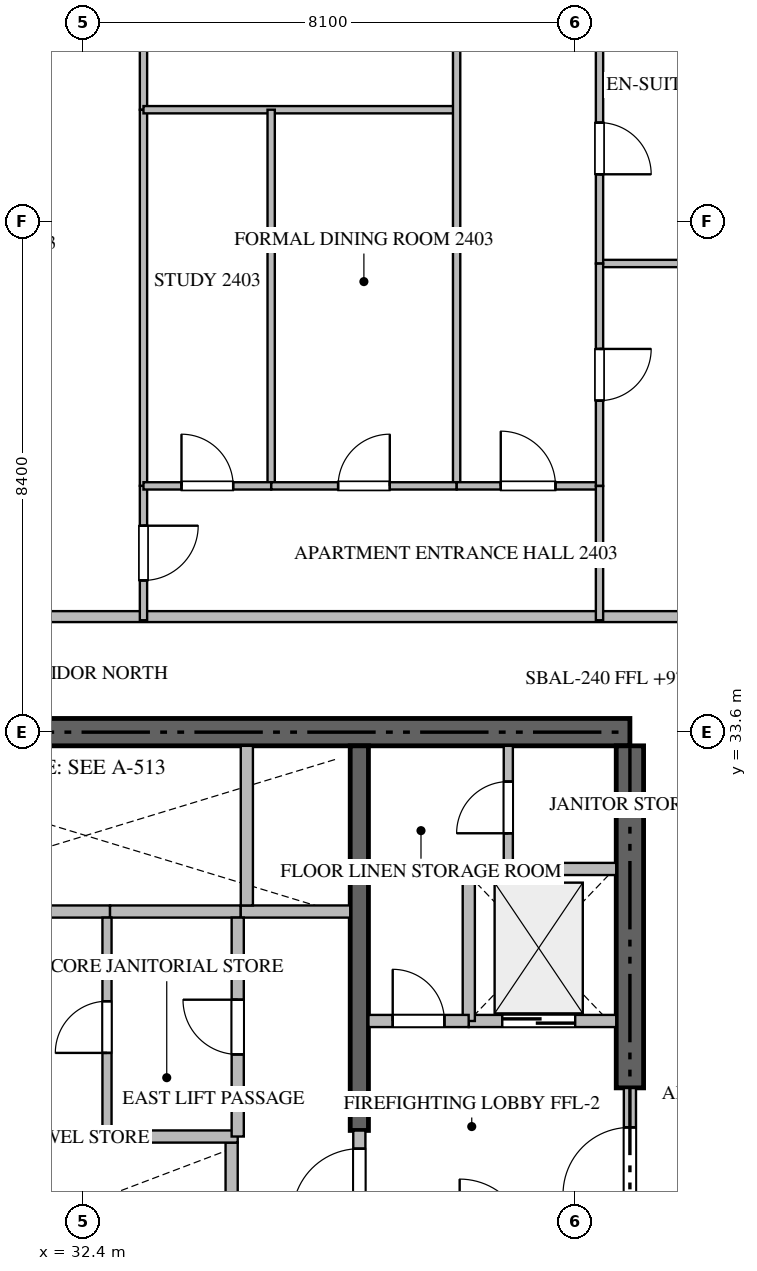
"""IFC4 building model, lengths in metres.
Left out: names, types, materials, properties, quantities, classifications, styles, units other than length and angle.
Written with IfcOpenShell. Run it as: python <this file> out.ifc"""

import sys

from ifc_helpers import new_model, si_unit, direction, frame, frame_2d, origin, place, context, subcontext, project, spatial, rectangle, extrude, source, transform, mapped, element, fill, save


model = new_model("IFC4")
c1 = context("Model", 3, precision=1e-05, world=origin(), true_north=direction((0.0, 1.0)))
c2 = subcontext(c1, "Body", "Model", "MODEL_VIEW")
j1 = project(units=[si_unit("LENGTHUNIT", "METRE"), si_unit("PLANEANGLEUNIT", "RADIAN")], contexts=[c1])
p1 = place(None, origin())
s1 = spatial("IfcSite", under=j1, at=p1, CompositionType="ELEMENT")
p2 = place(p1, origin())
s2 = spatial("IfcBuilding", under=s1, at=p2, CompositionType="ELEMENT")
p3 = place(p2, frame((0.0, 0.0, 97.95)))
s3 = spatial("IfcBuildingStorey", under=s2, at=p3, CompositionType="ELEMENT", Elevation=97.95)
p4 = place(p3, frame((41.4, 33.6, -0.26), z_axis=(0.0, 0.0, 1.0), x_axis=(-1.0, 0.0, 0.0)))
e1 = element("IfcWall", 1, at=p4, inside=s3, PredefinedType="SHEAR", context=c2, shape_type="SweptSolid", body=[
    extrude(rectangle(XDim=18.0, YDim=0.45, at=frame_2d((9.0, 0.0))), origin(), (0.0, 0.0, 1.0), 3.748),
])
p5 = place(p3, frame((41.4, 27.75, -0.26), z_axis=(0.0, 0.0, 1.0), x_axis=(0.0, 1.0, 0.0)))
e2 = element("IfcWall", 2, at=p5, inside=s3, PredefinedType="SHEAR", context=c2, shape_type="SweptSolid", body=[
    extrude(rectangle(XDim=5.625, YDim=0.45, at=frame_2d((2.812, 0.0))), origin(), (0.0, 0.0, 1.0), 3.748),
])
p6 = place(p3, frame((36.95, 27.05, -0.26), z_axis=(0.0, 0.0, 1.0), x_axis=(0.0, 1.0, 0.0)))
e3 = element("IfcWall", 3, at=p6, inside=s3, PredefinedType="SHEAR", context=c2, shape_type="SweptSolid", body=[
    extrude(rectangle(XDim=6.325, YDim=0.3, at=frame_2d((3.163, 0.0))), origin(), (0.0, 0.0, 1.0), 3.748),
])
p7 = place(p3, frame((38.75, 28.85, 0.0), z_axis=(0.0, 0.0, 1.0), x_axis=(1.0, 0.0, 0.0)))
e4 = element("IfcWall", 4, at=p7, inside=s3, PredefinedType="STANDARD", context=c2, shape_type="SweptSolid", body=[
    extrude(rectangle(XDim=2.425, YDim=0.2, at=frame_2d((1.212, 0.0))), origin(), (0.0, 0.0, 1.0), 3.49),
])
p8 = place(p7, frame((0.55, 0.0, 0.0)))
e5 = element("IfcOpeningElement", 5, at=p8, cuts=e4, PredefinedType="OPENING", context=c2, shape_type="SweptSolid", body=[
    extrude(rectangle(XDim=1.2, YDim=2.2, at=frame_2d((0.6, 1.1))), frame((0.0, 0.11, 0.0), z_axis=(0.0, -1.0, 0.0), x_axis=(1.0, 0.0, 0.0)), (0.0, 0.0, 1.0), 0.22),
])
p9 = place(p3, frame((34.85, 24.35, 0.0), z_axis=(0.0, 0.0, 1.0), x_axis=(0.0, 1.0, 0.0)))
e6 = element("IfcWall", 6, at=p9, inside=s3, PredefinedType="STANDARD", context=c2, shape_type="SweptSolid", body=[
    extrude(rectangle(XDim=2.5, YDim=0.2, at=frame_2d((1.25, 0.0))), origin(), (0.0, 0.0, 1.0), 3.49),
])
p10 = place(p3, frame((30.55, 30.65, 0.0), z_axis=(0.0, 0.0, 1.0), x_axis=(1.0, 0.0, 0.0)))
e7 = element("IfcWall", 7, at=p10, inside=s3, PredefinedType="STANDARD", context=c2, shape_type="SweptSolid", body=[
    extrude(rectangle(XDim=2.3, YDim=0.2, at=frame_2d((1.15, 0.0))), origin(), (0.0, 0.0, 1.0), 3.49),
])
p11 = place(p3, frame((32.85, 30.65, 0.0), z_axis=(0.0, 0.0, 1.0), x_axis=(1.0, 0.0, 0.0)))
e8 = element("IfcWall", 8, at=p11, inside=s3, PredefinedType="STANDARD", context=c2, shape_type="SweptSolid", body=[
    extrude(rectangle(XDim=2.15, YDim=0.2, at=frame_2d((1.075, 0.0))), origin(), (0.0, 0.0, 1.0), 3.49),
])
p12 = place(p3, frame((35.0, 30.65, 0.0), z_axis=(0.0, 0.0, 1.0), x_axis=(1.0, 0.0, 0.0)))
e9 = element("IfcWall", 9, at=p12, inside=s3, PredefinedType="STANDARD", context=c2, shape_type="SweptSolid", body=[
    extrude(rectangle(XDim=1.8, YDim=0.2, at=frame_2d((0.9, 0.0))), origin(), (0.0, 0.0, 1.0), 3.49),
])
p13 = place(p3, frame((35.1, 30.75, 0.0), z_axis=(0.0, 0.0, 1.0), x_axis=(0.0, 1.0, 0.0)))
e10 = element("IfcWall", 10, at=p13, inside=s3, PredefinedType="STANDARD", context=c2, shape_type="SweptSolid", body=[
    extrude(rectangle(XDim=2.625, YDim=0.2, at=frame_2d((1.312, 0.0))), origin(), (0.0, 0.0, 1.0), 3.49),
])
p14 = place(p3, frame((38.75, 28.85, 0.0), z_axis=(0.0, 0.0, 1.0), x_axis=(0.0, 1.0, 0.0)))
e11 = element("IfcWall", 11, at=p14, inside=s3, PredefinedType="STANDARD", context=c2, shape_type="SweptSolid", body=[
    extrude(rectangle(XDim=2.5, YDim=0.2, at=frame_2d((1.25, 0.0))), origin(), (0.0, 0.0, 1.0), 3.49),
])
p15 = place(p3, frame((38.75, 31.35, 0.0), z_axis=(0.0, 0.0, 1.0), x_axis=(1.0, 0.0, 0.0)))
e12 = element("IfcWall", 12, at=p15, inside=s3, PredefinedType="STANDARD", context=c2, shape_type="SweptSolid", body=[
    extrude(rectangle(XDim=2.425, YDim=0.2, at=frame_2d((1.212, 0.0))), origin(), (0.0, 0.0, 1.0), 3.49),
])
p16 = place(p3, frame((37.1, 28.85, 0.0), z_axis=(0.0, 0.0, 1.0), x_axis=(1.0, 0.0, 0.0)))
e13 = element("IfcWall", 13, at=p16, inside=s3, PredefinedType="STANDARD", context=c2, shape_type="SweptSolid", body=[
    extrude(rectangle(XDim=1.648, YDim=0.2, at=frame_2d((0.824, 0.0))), origin(), (0.0, 0.0, 1.0), 3.49),
])
p17 = place(p16, frame((0.399, 0.0, 0.0)))
e14 = element("IfcOpeningElement", 14, at=p17, cuts=e13, PredefinedType="OPENING", context=c2, shape_type="SweptSolid", body=[
    extrude(rectangle(XDim=0.85, YDim=2.1, at=frame_2d((0.425, 1.05))), frame((0.0, 0.11, 0.0), z_axis=(0.0, -1.0, 0.0), x_axis=(1.0, 0.0, 0.0)), (0.0, 0.0, 1.0), 0.22),
])
p18 = place(p3, frame((41.4, 25.352, 0.0), z_axis=(0.0, 0.0, 1.0), x_axis=(0.0, 1.0, 0.0)))
e15 = element("IfcWall", 15, at=p18, inside=s3, PredefinedType="STANDARD", context=c2, shape_type="SweptSolid", body=[
    extrude(rectangle(XDim=2.396, YDim=0.2, at=frame_2d((1.198, 0.0))), origin(), (0.0, 0.0, 1.0), 3.49),
])
p19 = place(p18, frame((0.648, 0.0, 0.0)))
e16 = element("IfcOpeningElement", 16, at=p19, cuts=e15, PredefinedType="OPENING", context=c2, shape_type="SweptSolid", body=[
    extrude(rectangle(XDim=1.1, YDim=2.15, at=frame_2d((0.55, 1.075))), frame((0.0, 0.11, 0.0), z_axis=(0.0, -1.0, 0.0), x_axis=(1.0, 0.0, 0.0)), (0.0, 0.0, 1.0), 0.22),
])
p20 = place(p3, frame((36.95, 25.352, 0.0), z_axis=(0.0, 0.0, 1.0), x_axis=(0.0, 1.0, 0.0)))
e17 = element("IfcWall", 17, at=p20, inside=s3, PredefinedType="STANDARD", context=c2, shape_type="SweptSolid", body=[
    extrude(rectangle(XDim=1.696, YDim=0.2, at=frame_2d((0.848, 0.0))), origin(), (0.0, 0.0, 1.0), 3.49),
])
p21 = place(p20, frame((0.298, 0.0, 0.0)))
e18 = element("IfcOpeningElement", 18, at=p21, cuts=e17, PredefinedType="OPENING", context=c2, shape_type="SweptSolid", body=[
    extrude(rectangle(XDim=1.1, YDim=2.15, at=frame_2d((0.55, 1.075))), frame((0.0, 0.11, 0.0), z_axis=(0.0, -1.0, 0.0), x_axis=(1.0, 0.0, 0.0)), (0.0, 0.0, 1.0), 0.22),
])
p22 = place(p3, frame((28.0, 26.95, 0.0), z_axis=(0.0, 0.0, 1.0), x_axis=(1.0, 0.0, 0.0)))
e19 = element("IfcWall", 19, at=p22, inside=s3, PredefinedType="STANDARD", context=c2, shape_type="SweptSolid", body=[
    extrude(rectangle(XDim=6.95, YDim=0.2, at=frame_2d((3.475, 0.0))), origin(), (0.0, 0.0, 1.0), 3.49),
])
p23 = place(p3, frame((39.4, 31.35, 0.0), z_axis=(0.0, 0.0, 1.0), x_axis=(0.0, 1.0, 0.0)))
e20 = element("IfcWall", 20, at=p23, inside=s3, PredefinedType="PARTITIONING", context=c2, shape_type="SweptSolid", body=[
    extrude(rectangle(XDim=2.025, YDim=0.15, at=frame_2d((1.012, 0.0))), origin(), (0.0, 0.0, 1.0), 3.49),
])
p24 = place(p23, frame((0.587, 0.0, 0.0)))
e21 = element("IfcOpeningElement", 21, at=p24, cuts=e20, PredefinedType="OPENING", context=c2, shape_type="SweptSolid", body=[
    extrude(rectangle(XDim=0.85, YDim=2.1, at=frame_2d((0.425, 1.05))), frame((0.0, 0.085, 0.0), z_axis=(0.0, -1.0, 0.0), x_axis=(1.0, 0.0, 0.0)), (0.0, 0.0, 1.0), 0.17),
])
p25 = place(p3, frame((34.95, 26.95, 0.0), z_axis=(0.0, 0.0, 1.0), x_axis=(0.0, 1.0, 0.0)))
e22 = element("IfcWall", 22, at=p25, inside=s3, PredefinedType="STANDARD", context=c2, shape_type="SweptSolid", body=[
    extrude(rectangle(XDim=3.6, YDim=0.2, at=frame_2d((1.8, 0.0))), origin(), (0.0, 0.0, 1.0), 3.49),
])
p26 = place(p25, frame((1.35, 0.0, 0.0)))
e23 = element("IfcOpeningElement", 23, at=p26, cuts=e22, PredefinedType="OPENING", context=c2, shape_type="SweptSolid", body=[
    extrude(rectangle(XDim=0.9, YDim=2.1, at=frame_2d((0.45, 1.05))), frame((0.0, 0.11, 0.0), z_axis=(0.0, -1.0, 0.0), x_axis=(1.0, 0.0, 0.0)), (0.0, 0.0, 1.0), 0.22),
])
p27 = place(p3, frame((32.8, 26.95, 0.0), z_axis=(0.0, 0.0, 1.0), x_axis=(0.0, 1.0, 0.0)))
e24 = element("IfcWall", 24, at=p27, inside=s3, PredefinedType="PARTITIONING", context=c2, shape_type="SweptSolid", body=[
    extrude(rectangle(XDim=3.6, YDim=0.15, at=frame_2d((1.8, 0.0))), origin(), (0.0, 0.0, 1.0), 3.49),
])
p28 = place(p27, frame((1.375, 0.0, 0.0)))
e25 = element("IfcOpeningElement", 25, at=p28, cuts=e24, PredefinedType="OPENING", context=c2, shape_type="SweptSolid", body=[
    extrude(rectangle(XDim=0.85, YDim=2.1, at=frame_2d((0.425, 1.05))), frame((0.0, 0.085, 0.0), z_axis=(0.0, -1.0, 0.0), x_axis=(1.0, 0.0, 0.0)), (0.0, 0.0, 1.0), 0.17),
])
p29 = place(p3, frame((21.402, 35.5, 0.0), z_axis=(0.0, 0.0, 1.0), x_axis=(1.0, 0.0, 0.0)))
e26 = element("IfcWall", 26, at=p29, inside=s3, PredefinedType="PARTITIONING", context=c2, shape_type="SweptSolid", body=[
    extrude(rectangle(XDim=21.996, YDim=0.18, at=frame_2d((10.998, 0.0))), origin(), (0.0, 0.0, 1.0), 3.49),
])
p30 = place(p29, frame((7.202, 0.0, 0.0)))
e27 = element("IfcOpeningElement", 27, at=p30, cuts=e26, PredefinedType="OPENING", context=c2, shape_type="SweptSolid", body=[
    extrude(rectangle(XDim=1.0, YDim=2.15, at=frame_2d((0.5, 1.075))), frame((0.0, 0.1, 0.0), z_axis=(0.0, -1.0, 0.0), x_axis=(1.0, 0.0, 0.0)), (0.0, 0.0, 1.0), 0.2),
])
p31 = place(p3, frame((33.4, 37.65, 0.0), z_axis=(0.0, 0.0, 1.0), x_axis=(0.0, -1.0, 0.0)))
e28 = element("IfcWall", 28, at=p31, inside=s3, PredefinedType="PARTITIONING", context=c2, shape_type="SweptSolid", body=[
    extrude(rectangle(XDim=2.21, YDim=0.12, at=frame_2d((1.105, 0.0))), origin(), (0.0, 0.0, 1.0), 3.49),
])
p32 = place(p31, frame((0.655, 0.0, 0.0)))
e29 = element("IfcOpeningElement", 29, at=p32, cuts=e28, PredefinedType="OPENING", context=c2, shape_type="SweptSolid", body=[
    extrude(rectangle(XDim=0.9, YDim=2.1, at=frame_2d((0.45, 1.05))), frame((0.0, 0.07, 0.0), z_axis=(0.0, -1.0, 0.0), x_axis=(1.0, 0.0, 0.0)), (0.0, 0.0, 1.0), 0.14),
])
p33 = place(p3, frame((33.4, 50.105, 0.0), z_axis=(0.0, 0.0, 1.0), x_axis=(0.0, -1.0, 0.0)))
e30 = element("IfcWall", 30, at=p33, inside=s3, PredefinedType="PARTITIONING", context=c2, shape_type="SweptSolid", body=[
    extrude(rectangle(XDim=6.269, YDim=0.12, at=frame_2d((3.135, 0.0))), origin(), (0.0, 0.0, 1.0), 3.49),
])
p34 = place(p33, frame((2.953, 0.0, 0.0)))
e31 = element("IfcOpeningElement", 31, at=p34, cuts=e30, PredefinedType="OPENING", context=c2, shape_type="SweptSolid", body=[
    extrude(rectangle(XDim=0.9, YDim=2.1, at=frame_2d((0.45, 1.05))), frame((0.0, 0.07, 0.0), z_axis=(0.0, -1.0, 0.0), x_axis=(1.0, 0.0, 0.0)), (0.0, 0.0, 1.0), 0.14),
])
p35 = place(p3, frame((33.4, 43.834, 0.0), z_axis=(0.0, 0.0, 1.0), x_axis=(0.0, -1.0, 0.0)))
e32 = element("IfcWall", 32, at=p35, inside=s3, PredefinedType="PARTITIONING", context=c2, shape_type="SweptSolid", body=[
    extrude(rectangle(XDim=6.182, YDim=0.12, at=frame_2d((3.091, 0.0))), origin(), (0.0, 0.0, 1.0), 3.49),
])
p36 = place(p3, frame((33.4, 43.836, 0.0), z_axis=(0.0, 0.0, 1.0), x_axis=(1.0, 0.0, 0.0)))
e33 = element("IfcWall", 33, at=p36, inside=s3, PredefinedType="PARTITIONING", context=c2, shape_type="SweptSolid", body=[
    extrude(rectangle(XDim=5.15, YDim=0.12, at=frame_2d((2.575, 0.0))), origin(), (0.0, 0.0, 1.0), 3.49),
])
p37 = place(p3, frame((38.55, 50.105, 0.0), z_axis=(0.0, 0.0, 1.0), x_axis=(0.0, -1.0, 0.0)))
e34 = element("IfcWall", 34, at=p37, inside=s3, PredefinedType="PARTITIONING", context=c2, shape_type="SweptSolid", body=[
    extrude(rectangle(XDim=12.455, YDim=0.12, at=frame_2d((6.228, 0.0))), origin(), (0.0, 0.0, 1.0), 3.49),
])
p38 = place(p3, frame((35.5, 43.836, 0.0), z_axis=(0.0, 0.0, 1.0), x_axis=(0.0, -1.0, 0.0)))
e35 = element("IfcWall", 35, at=p38, inside=s3, PredefinedType="PARTITIONING", context=c2, shape_type="SweptSolid", body=[
    extrude(rectangle(XDim=6.186, YDim=0.12, at=frame_2d((3.093, 0.0))), origin(), (0.0, 0.0, 1.0), 3.49),
])
p39 = place(p3, frame((33.4, 37.65, 0.0), z_axis=(0.0, 0.0, 1.0), x_axis=(1.0, 0.0, 0.0)))
e36 = element("IfcWall", 36, at=p39, inside=s3, PredefinedType="PARTITIONING", context=c2, shape_type="SweptSolid", body=[
    extrude(rectangle(XDim=2.1, YDim=0.12, at=frame_2d((1.05, 0.0))), origin(), (0.0, 0.0, 1.0), 3.49),
])
p40 = place(p39, frame((0.625, 0.0, 0.0)))
e37 = element("IfcOpeningElement", 37, at=p40, cuts=e36, PredefinedType="OPENING", context=c2, shape_type="SweptSolid", body=[
    extrude(rectangle(XDim=0.85, YDim=2.1, at=frame_2d((0.425, 1.05))), frame((0.0, 0.07, 0.0), z_axis=(0.0, -1.0, 0.0), x_axis=(1.0, 0.0, 0.0)), (0.0, 0.0, 1.0), 0.14),
])
p41 = place(p3, frame((35.502, 37.65, 0.0), z_axis=(0.0, 0.0, 1.0), x_axis=(1.0, 0.0, 0.0)))
e38 = element("IfcWall", 38, at=p41, inside=s3, PredefinedType="PARTITIONING", context=c2, shape_type="SweptSolid", body=[
    extrude(rectangle(XDim=3.048, YDim=0.12, at=frame_2d((1.524, 0.0))), origin(), (0.0, 0.0, 1.0), 3.49),
])
p42 = place(p41, frame((1.099, 0.0, 0.0)))
e39 = element("IfcOpeningElement", 39, at=p42, cuts=e38, PredefinedType="OPENING", context=c2, shape_type="SweptSolid", body=[
    extrude(rectangle(XDim=0.85, YDim=2.1, at=frame_2d((0.425, 1.05))), frame((0.0, 0.07, 0.0), z_axis=(0.0, -1.0, 0.0), x_axis=(1.0, 0.0, 0.0)), (0.0, 0.0, 1.0), 0.14),
])
p43 = place(p3, frame((38.552, 37.65, 0.0), z_axis=(0.0, 0.0, 1.0), x_axis=(1.0, 0.0, 0.0)))
e40 = element("IfcWall", 40, at=p43, inside=s3, PredefinedType="PARTITIONING", context=c2, shape_type="SweptSolid", body=[
    extrude(rectangle(XDim=2.348, YDim=0.12, at=frame_2d((1.174, 0.0))), origin(), (0.0, 0.0, 1.0), 3.49),
])
p44 = place(p43, frame((0.724, 0.0, 0.0)))
e41 = element("IfcOpeningElement", 41, at=p44, cuts=e40, PredefinedType="OPENING", context=c2, shape_type="SweptSolid", body=[
    extrude(rectangle(XDim=0.9, YDim=2.1, at=frame_2d((0.45, 1.05))), frame((0.0, 0.07, 0.0), z_axis=(0.0, -1.0, 0.0), x_axis=(1.0, 0.0, 0.0)), (0.0, 0.0, 1.0), 0.14),
])
p45 = place(p3, frame((40.9, 41.307, 0.0), z_axis=(0.0, 0.0, 1.0), x_axis=(1.0, 0.0, 0.0)))
e42 = element("IfcWall", 42, at=p45, inside=s3, PredefinedType="PARTITIONING", context=c2, shape_type="SweptSolid", body=[
    extrude(rectangle(XDim=3.7, YDim=0.12, at=frame_2d((1.85, 0.0))), origin(), (0.0, 0.0, 1.0), 3.49),
])
p46 = place(p3, frame((40.9, 45.091, 0.0), z_axis=(0.0, 0.0, 1.0), x_axis=(0.0, -1.0, 0.0)))
e43 = element("IfcWall", 43, at=p46, inside=s3, PredefinedType="PARTITIONING", context=c2, shape_type="SweptSolid", body=[
    extrude(rectangle(XDim=3.784, YDim=0.12, at=frame_2d((1.892, 0.0))), origin(), (0.0, 0.0, 1.0), 3.49),
])
p47 = place(p46, frame((1.467, 0.0, 0.0)))
e44 = element("IfcOpeningElement", 44, at=p47, cuts=e43, PredefinedType="OPENING", context=c2, shape_type="SweptSolid", body=[
    extrude(rectangle(XDim=0.85, YDim=2.1, at=frame_2d((0.425, 1.05))), frame((0.0, 0.07, 0.0), z_axis=(0.0, -1.0, 0.0), x_axis=(1.0, 0.0, 0.0)), (0.0, 0.0, 1.0), 0.14),
])
p48 = place(p3, frame((40.9, 41.305, 0.0), z_axis=(0.0, 0.0, 1.0), x_axis=(0.0, -1.0, 0.0)))
e45 = element("IfcWall", 45, at=p48, inside=s3, PredefinedType="PARTITIONING", context=c2, shape_type="SweptSolid", body=[
    extrude(rectangle(XDim=3.655, YDim=0.12, at=frame_2d((1.828, 0.0))), origin(), (0.0, 0.0, 1.0), 3.49),
])
p49 = place(p48, frame((1.403, 0.0, 0.0)))
e46 = element("IfcOpeningElement", 46, at=p49, cuts=e45, PredefinedType="OPENING", context=c2, shape_type="SweptSolid", body=[
    extrude(rectangle(XDim=0.85, YDim=2.1, at=frame_2d((0.425, 1.05))), frame((0.0, 0.07, 0.0), z_axis=(0.0, -1.0, 0.0), x_axis=(1.0, 0.0, 0.0)), (0.0, 0.0, 1.0), 0.14),
])
p50 = place(p3, frame((40.9, 37.648, 0.0), z_axis=(0.0, 0.0, 1.0), x_axis=(0.0, -1.0, 0.0)))
e47 = element("IfcWall", 47, at=p50, inside=s3, PredefinedType="PARTITIONING", context=c2, shape_type="SweptSolid", body=[
    extrude(rectangle(XDim=2.208, YDim=0.12, at=frame_2d((1.104, 0.0))), origin(), (0.0, 0.0, 1.0), 3.49),
])
m1 = source(origin(), c2, "Body", "SweptSolid", [
    extrude(rectangle(XDim=1.2, YDim=2.2, at=frame_2d((0.6, 1.1))), frame((0.0, 0.025, 0.0), z_axis=(0.0, -1.0, 0.0), x_axis=(1.0, 0.0, 0.0)), (0.0, 0.0, 1.0), 0.05),
])
p51 = place(p8, origin())
e48 = element("IfcDoor", 48, at=p51, inside=s3, OperationType="DOUBLE_DOOR_SLIDING", PredefinedType="DOOR", context=c2, shape_type="MappedRepresentation", body=[
    mapped(m1, transform((0.0, 0.0, 0.0), scale=1.0)),
])
fill(e5, e48)
m2 = source(origin(), c2, "Body", "SweptSolid", [
    extrude(rectangle(XDim=0.85, YDim=2.1, at=frame_2d((0.425, 1.05))), frame((0.0, 0.025, 0.0), z_axis=(0.0, -1.0, 0.0), x_axis=(1.0, 0.0, 0.0)), (0.0, 0.0, 1.0), 0.05),
])
p52 = place(p17, origin())
e49 = element("IfcDoor", 49, at=p52, inside=s3, OperationType="SINGLE_SWING_LEFT", PredefinedType="DOOR", context=c2, shape_type="MappedRepresentation", body=[
    mapped(m2, transform((0.0, 0.0, 0.0), scale=1.0)),
])
fill(e14, e49)
m3 = source(origin(), c2, "Body", "SweptSolid", [
    extrude(rectangle(XDim=1.1, YDim=2.15, at=frame_2d((0.55, 1.075))), frame((0.0, 0.025, 0.0), z_axis=(0.0, -1.0, 0.0), x_axis=(1.0, 0.0, 0.0)), (0.0, 0.0, 1.0), 0.05),
])
p53 = place(p19, origin())
e50 = element("IfcDoor", 50, at=p53, inside=s3, OperationType="SINGLE_SWING_LEFT", PredefinedType="DOOR", context=c2, shape_type="MappedRepresentation", body=[
    mapped(m3, transform((0.0, 0.0, 0.0), scale=1.0)),
])
fill(e16, e50)
p54 = place(p21, origin())
e51 = element("IfcDoor", 51, at=p54, inside=s3, OperationType="SINGLE_SWING_LEFT", PredefinedType="DOOR", context=c2, shape_type="MappedRepresentation", body=[
    mapped(m3, transform((0.0, 0.0, 0.0), scale=1.0)),
])
fill(e18, e51)
p55 = place(p24, origin())
e52 = element("IfcDoor", 52, at=p55, inside=s3, OperationType="SINGLE_SWING_LEFT", PredefinedType="DOOR", context=c2, shape_type="MappedRepresentation", body=[
    mapped(m2, transform((0.0, 0.0, 0.0), scale=1.0)),
])
fill(e21, e52)
m4 = source(origin(), c2, "Body", "SweptSolid", [
    extrude(rectangle(XDim=0.9, YDim=2.1, at=frame_2d((0.45, 1.05))), frame((0.0, 0.025, 0.0), z_axis=(0.0, -1.0, 0.0), x_axis=(1.0, 0.0, 0.0)), (0.0, 0.0, 1.0), 0.05),
])
p56 = place(p26, origin())
e53 = element("IfcDoor", 53, at=p56, inside=s3, OperationType="SINGLE_SWING_RIGHT", PredefinedType="DOOR", context=c2, shape_type="MappedRepresentation", body=[
    mapped(m4, transform((0.0, 0.0, 0.0), scale=1.0)),
])
fill(e23, e53)
p57 = place(p28, origin())
e54 = element("IfcDoor", 54, at=p57, inside=s3, OperationType="SINGLE_SWING_LEFT", PredefinedType="DOOR", context=c2, shape_type="MappedRepresentation", body=[
    mapped(m2, transform((0.0, 0.0, 0.0), scale=1.0)),
])
fill(e25, e54)
p58 = place(p32, origin())
e55 = element("IfcDoor", 55, at=p58, inside=s3, OperationType="SINGLE_SWING_LEFT", PredefinedType="DOOR", context=c2, shape_type="MappedRepresentation", body=[
    mapped(m4, transform((0.0, 0.0, 0.0), scale=1.0)),
])
fill(e29, e55)
p59 = place(p40, origin())
e56 = element("IfcDoor", 56, at=p59, inside=s3, OperationType="SINGLE_SWING_LEFT", PredefinedType="DOOR", context=c2, shape_type="MappedRepresentation", body=[
    mapped(m2, transform((0.0, 0.0, 0.0), scale=1.0)),
])
fill(e37, e56)
p60 = place(p42, origin())
e57 = element("IfcDoor", 57, at=p60, inside=s3, OperationType="SINGLE_SWING_RIGHT", PredefinedType="DOOR", context=c2, shape_type="MappedRepresentation", body=[
    mapped(m2, transform((0.0, 0.0, 0.0), scale=1.0)),
])
fill(e39, e57)
p61 = place(p44, origin())
e58 = element("IfcDoor", 58, at=p61, inside=s3, OperationType="SINGLE_SWING_LEFT", PredefinedType="DOOR", context=c2, shape_type="MappedRepresentation", body=[
    mapped(m4, transform((0.0, 0.0, 0.0), scale=1.0)),
])
fill(e41, e58)
p62 = place(p47, origin())
e59 = element("IfcDoor", 59, at=p62, inside=s3, OperationType="SINGLE_SWING_RIGHT", PredefinedType="DOOR", context=c2, shape_type="MappedRepresentation", body=[
    mapped(m2, transform((0.0, 0.0, 0.0), scale=1.0)),
])
fill(e44, e59)
p63 = place(p49, origin())
e60 = element("IfcDoor", 60, at=p63, inside=s3, OperationType="SINGLE_SWING_LEFT", PredefinedType="DOOR", context=c2, shape_type="MappedRepresentation", body=[
    mapped(m2, transform((0.0, 0.0, 0.0), scale=1.0)),
])
fill(e46, e60)
save(model, sys.argv[1])
